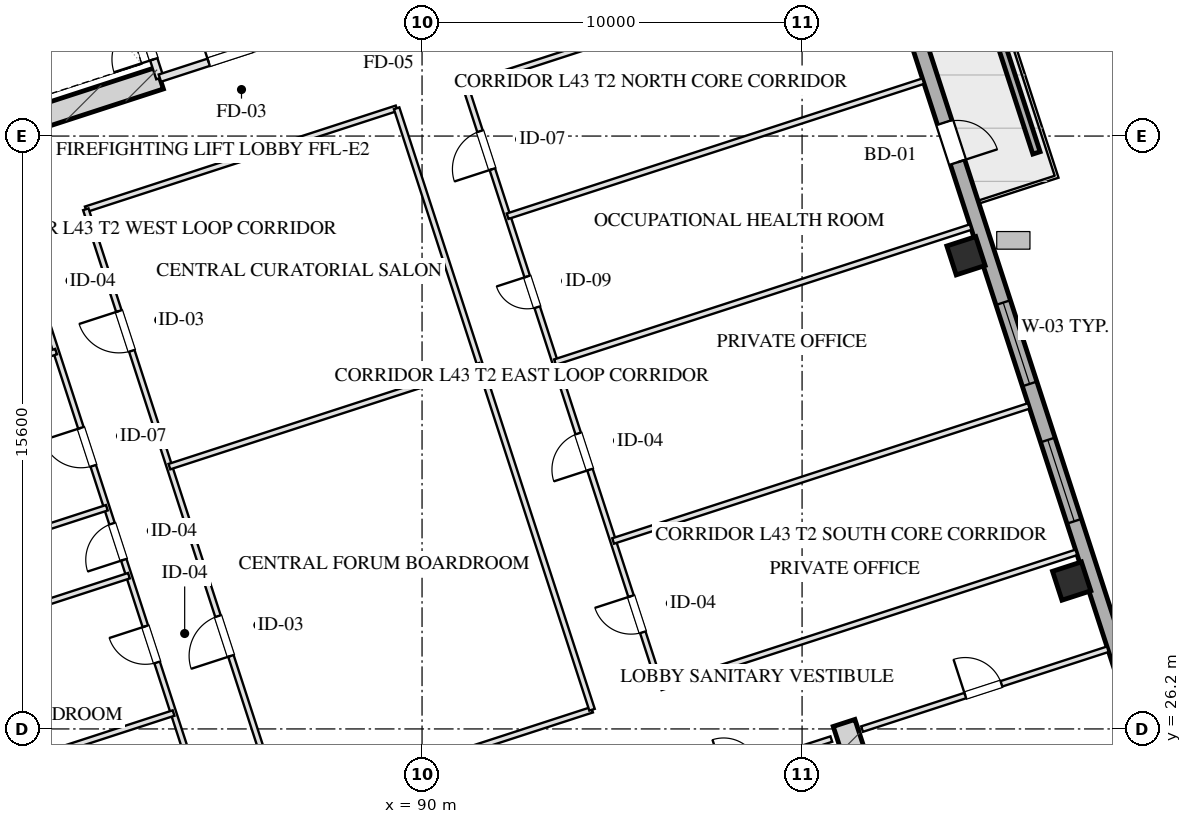
"""IFC4 building model, lengths in metres.
Left out: names, types, materials, properties, quantities, classifications, styles, units other than length and angle.
Written with IfcOpenShell. Run it as: python <this file> out.ifc"""

import sys

from ifc_helpers import new_model, si_unit, direction, frame, frame_2d, origin, origin_2d, place, context, subcontext, project, spatial, rectangle, hollow_rectangle, extrude, element, fill, save


model = new_model("IFC4")
c1 = context("Model", 3, precision=1e-05, world=origin(), true_north=direction((0.0, 1.0)))
c2 = subcontext(c1, "Body", "Model", "MODEL_VIEW")
j1 = project(units=[si_unit("LENGTHUNIT", "METRE"), si_unit("PLANEANGLEUNIT", "RADIAN")], contexts=[c1])
p1 = place(None, origin())
s1 = spatial("IfcSite", under=j1, at=p1, CompositionType="ELEMENT")
p2 = place(p1, origin())
s2 = spatial("IfcBuilding", under=s1, at=p2, CompositionType="ELEMENT")
p3 = place(p2, frame((0.0, 0.0, 163.3)))
s3 = spatial("IfcBuildingStorey", under=s2, at=p3, CompositionType="ELEMENT", Elevation=163.3)
p4 = place(p3, frame((101.105, 26.358, 0.0), z_axis=(0.0, 0.0, 1.0), x_axis=(0.309010370028, -0.95105866865, 0.0)))
e1 = element("IfcWall", 1, at=p4, inside=s3, PredefinedType="SHEAR", context=c2, shape_type="SweptSolid", body=[
    extrude(rectangle(XDim=9.48, YDim=0.6, at=frame_2d((4.74, 0.0))), origin(), (0.0, 0.0, 1.0), 3.45),
])
p5 = place(p3, frame((79.087, 42.021, 0.0), z_axis=(0.0, 0.0, 1.0), x_axis=(0.951062550203, 0.3089984233, 0.0)))
e2 = element("IfcWall", 2, at=p5, inside=s3, PredefinedType="SHEAR", context=c2, shape_type="SweptSolid", body=[
    extrude(rectangle(XDim=4.22, YDim=0.6, at=frame_2d((2.11, 0.0))), origin(), (0.0, 0.0, 1.0), 3.45),
])
for number, where, z_axis, x_axis in (
    (3, (107.094, 30.091, 0.0), (0.0, 0.0, 1.0), (0.951, 0.309, 0.0)),
    (4, (104.313, 38.651, 0.0), (0.0, 0.0, 1.0), (0.951, 0.309, 0.0)),
):
    element("IfcColumn", number, at=place(p3, frame(where, z_axis=z_axis, x_axis=x_axis)), inside=s3, PredefinedType="COLUMN", context=c2, shape_type="SweptSolid", body=[
        extrude(hollow_rectangle(XDim=0.8, YDim=0.8, WallThickness=0.028, at=origin_2d()), origin(), (0.0, 0.0, 1.0), 3.451),
    ])
p6 = place(p3, frame((81.776, 8.827, 0.0), z_axis=(0.0, 0.0, 1.0), x_axis=(-0.309014228706, 0.951057414911, 0.0)))
e5 = element("IfcWall", 5, at=p6, inside=s3, PredefinedType="SOLIDWALL", context=c2, shape_type="SweptSolid", body=[
    extrude(rectangle(XDim=42.8, YDim=0.4, at=frame_2d((21.4, 0.0))), origin(), (0.0, 0.0, 1.0), 2.61),
])
p7 = place(p6, frame((23.45, 0.0, 0.0)))
e6 = element("IfcOpeningElement", 6, at=p7, cuts=e5, PredefinedType="OPENING", context=c2, shape_type="SweptSolid", body=[
    extrude(rectangle(XDim=1.1, YDim=2.15, at=frame_2d((0.55, 1.075))), frame((0.0, 0.21, 0.0), z_axis=(0.0, -1.0, 0.0), x_axis=(1.0, 0.0, 0.0)), (0.0, 0.0, 1.0), 0.42),
])
p8 = place(p3, frame((98.224, 59.173, 0.0), z_axis=(0.0, 0.0, 1.0), x_axis=(0.309014228706, -0.951057414911, 0.0)))
e7 = element("IfcWall", 7, at=p8, inside=s3, PredefinedType="SOLIDWALL", context=c2, shape_type="SweptSolid", body=[
    extrude(rectangle(XDim=42.8, YDim=0.4, at=frame_2d((21.4, 0.0))), origin(), (0.0, 0.0, 1.0), 2.61),
])
p9 = place(p8, frame((26.675, 0.0, 0.75)))
e8 = element("IfcOpeningElement", 8, at=p9, cuts=e7, PredefinedType="OPENING", context=c2, shape_type="SweptSolid", body=[
    extrude(rectangle(XDim=2.25, YDim=1.46, at=frame_2d((1.125, 0.73))), frame((0.0, 0.21, 0.0), z_axis=(0.0, -1.0, 0.0), x_axis=(1.0, 0.0, 0.0)), (0.0, 0.0, 1.0), 0.42),
])
p10 = place(p8, frame((22.875, 0.0, 0.75)))
e9 = element("IfcOpeningElement", 9, at=p10, cuts=e7, PredefinedType="OPENING", context=c2, shape_type="SweptSolid", body=[
    extrude(rectangle(XDim=2.25, YDim=1.46, at=frame_2d((1.125, 0.73))), frame((0.0, 0.21, 0.0), z_axis=(0.0, -1.0, 0.0), x_axis=(1.0, 0.0, 0.0)), (0.0, 0.0, 1.0), 0.42),
])
p11 = place(p8, frame((17.892, 0.0, 0.0)))
e10 = element("IfcOpeningElement", 10, at=p11, cuts=e7, PredefinedType="OPENING", context=c2, shape_type="SweptSolid", body=[
    extrude(rectangle(XDim=1.1, YDim=2.15, at=frame_2d((0.55, 1.075))), frame((0.0, 0.21, 0.0), z_axis=(0.0, -1.0, 0.0), x_axis=(1.0, 0.0, 0.0)), (0.0, 0.0, 1.0), 0.42),
])
p12 = place(p3, frame((106.168, 41.356, 0.0), z_axis=(0.0, 0.0, 1.0), x_axis=(-0.309032019345, 0.951051634255, 0.0)))
e11 = element("IfcWall", 11, at=p12, inside=s3, PredefinedType="PARAPET", context=c2, shape_type="SweptSolid", body=[
    extrude(rectangle(XDim=4.8, YDim=0.2, at=frame_2d((2.4, 0.0))), origin(), (0.0, 0.0, 1.0), 0.75),
])
p13 = place(p3, frame((97.727, 24.944, 0.0), z_axis=(0.0, 0.0, 1.0), x_axis=(0.951036872128, 0.309077446369, 0.0)))
e12 = element("IfcWall", 12, at=p13, inside=s3, PredefinedType="PARTITIONING", context=c2, shape_type="SweptSolid", body=[
    extrude(rectangle(XDim=3.2, YDim=0.15, at=frame_2d((1.6, 0.0))), origin(), (0.0, 0.0, 1.0), 3.175),
])
p14 = place(p13, frame((0.22, 0.0, 0.0)))
e13 = element("IfcOpeningElement", 13, at=p14, cuts=e12, PredefinedType="OPENING", context=c2, shape_type="SweptSolid", body=[
    extrude(rectangle(XDim=0.95, YDim=2.05, at=frame_2d((0.475, 1.025))), frame((0.0, 0.085, 0.0), z_axis=(0.0, -1.0, 0.0), x_axis=(1.0, 0.0, 0.0)), (0.0, 0.0, 1.0), 0.17),
])
p15 = place(p3, frame((83.101, 43.324, 0.0), z_axis=(0.0, 0.0, 1.0), x_axis=(-0.309048298632, 0.951046344356, 0.0)))
e14 = element("IfcWall", 14, at=p15, inside=s3, PredefinedType="PARTITIONING", context=c2, shape_type="SweptSolid", body=[
    extrude(rectangle(XDim=1.9, YDim=0.2, at=frame_2d((0.95, 0.0))), origin(), (0.0, 0.0, 1.0), 3.175),
])
p16 = place(p15, frame((0.52, 0.0, 0.0)))
e15 = element("IfcOpeningElement", 15, at=p16, cuts=e14, PredefinedType="OPENING", context=c2, shape_type="SweptSolid", body=[
    extrude(rectangle(XDim=1.1, YDim=2.05, at=frame_2d((0.55, 1.025))), frame((0.0, 0.11, 0.0), z_axis=(0.0, -1.0, 0.0), x_axis=(1.0, 0.0, 0.0)), (0.0, 0.0, 1.0), 0.22),
])
p17 = place(p3, frame((83.101, 43.324, 0.0), z_axis=(0.0, 0.0, 1.0), x_axis=(0.951052804469, 0.309028417967, 0.0)))
e16 = element("IfcWall", 16, at=p17, inside=s3, PredefinedType="PARTITIONING", context=c2, shape_type="SweptSolid", body=[
    extrude(rectangle(XDim=3.83, YDim=0.2, at=frame_2d((1.915, 0.0))), origin(), (0.0, 0.0, 1.0), 3.175),
])
p18 = place(p17, frame((1.35, 0.0, 0.0)))
e17 = element("IfcOpeningElement", 17, at=p18, cuts=e16, PredefinedType="OPENING", context=c2, shape_type="SweptSolid", body=[
    extrude(rectangle(XDim=1.2, YDim=2.05, at=frame_2d((0.6, 1.025))), frame((0.0, 0.11, 0.0), z_axis=(0.0, -1.0, 0.0), x_axis=(1.0, 0.0, 0.0)), (0.0, 0.0, 1.0), 0.22),
])
p19 = place(p3, frame((101.578, 26.196, 0.0), z_axis=(0.0, 0.0, 1.0), x_axis=(0.951064934653, 0.308991084134, 0.0)))
e18 = element("IfcWall", 18, at=p19, inside=s3, PredefinedType="PARTITIONING", context=c2, shape_type="SweptSolid", body=[
    extrude(rectangle(XDim=6.8, YDim=0.15, at=frame_2d((3.4, 0.0))), origin(), (0.0, 0.0, 1.0), 3.175),
])
p20 = place(p19, frame((2.856, 0.0, 0.0)))
e19 = element("IfcOpeningElement", 19, at=p20, cuts=e18, PredefinedType="OPENING", context=c2, shape_type="SweptSolid", body=[
    extrude(rectangle(XDim=1.0, YDim=2.05, at=frame_2d((0.5, 1.025))), frame((0.0, 0.085, 0.0), z_axis=(0.0, -1.0, 0.0), x_axis=(1.0, 0.0, 0.0)), (0.0, 0.0, 1.0), 0.17),
])
p21 = place(p3, frame((86.294, 24.048, 0.0), z_axis=(0.0, 0.0, 1.0), x_axis=(0.951052008164, 0.309030868631, 0.0)))
e20 = element("IfcWall", 20, at=p21, inside=s3, PredefinedType="PARTITIONING", context=c2, shape_type="SweptSolid", body=[
    extrude(rectangle(XDim=8.6, YDim=0.15, at=frame_2d((4.3, 0.0))), origin(), (0.0, 0.0, 1.0), 3.175),
])
p22 = place(p3, frame((96.28, 27.292, 0.0), z_axis=(0.0, 0.0, 1.0), x_axis=(0.951056999652, 0.309015506751, 0.0)))
e21 = element("IfcWall", 21, at=p22, inside=s3, PredefinedType="PARTITIONING", context=c2, shape_type="SweptSolid", body=[
    extrude(rectangle(XDim=11.5, YDim=0.15, at=frame_2d((5.75, 0.0))), origin(), (0.0, 0.0, 1.0), 3.175),
])
p23 = place(p3, frame((81.152, 39.873, 0.0), z_axis=(0.0, 0.0, 1.0), x_axis=(0.951057640494, 0.309013534425, 0.0)))
e22 = element("IfcWall", 22, at=p23, inside=s3, PredefinedType="PARTITIONING", context=c2, shape_type="SweptSolid", body=[
    extrude(rectangle(XDim=8.6, YDim=0.15, at=frame_2d((4.3, 0.0))), origin(), (0.0, 0.0, 1.0), 3.175),
])
p24 = place(p3, frame((91.138, 43.118, 0.0), z_axis=(0.0, 0.0, 1.0), x_axis=(0.951054972381, 0.309021746015, 0.0)))
e23 = element("IfcWall", 23, at=p24, inside=s3, PredefinedType="PARTITIONING", context=c2, shape_type="SweptSolid", body=[
    extrude(rectangle(XDim=11.5, YDim=0.15, at=frame_2d((5.75, 0.0))), origin(), (0.0, 0.0, 1.0), 3.175),
])
p25 = place(p3, frame((84.487, 23.46, 0.0), z_axis=(0.0, 0.0, 1.0), x_axis=(-0.30901773025, 0.951056277195, 0.0)))
e24 = element("IfcWall", 24, at=p25, inside=s3, PredefinedType="PARTITIONING", context=c2, shape_type="SweptSolid", body=[
    extrude(rectangle(XDim=16.64, YDim=0.15, at=frame_2d((8.32, 0.0))), origin(), (0.0, 0.0, 1.0), 3.175),
])
p26 = place(p25, frame((1.16, 0.0, 0.0)))
e25 = element("IfcOpeningElement", 25, at=p26, cuts=e24, PredefinedType="OPENING", context=c2, shape_type="SweptSolid", body=[
    extrude(rectangle(XDim=1.0, YDim=2.05, at=frame_2d((0.5, 1.025))), frame((0.0, 0.085, 0.0), z_axis=(0.0, -1.0, 0.0), x_axis=(1.0, 0.0, 0.0)), (0.0, 0.0, 1.0), 0.17),
])
p27 = place(p25, frame((4.72, 0.0, 0.0)))
e26 = element("IfcOpeningElement", 26, at=p27, cuts=e24, PredefinedType="OPENING", context=c2, shape_type="SweptSolid", body=[
    extrude(rectangle(XDim=1.0, YDim=2.05, at=frame_2d((0.5, 1.025))), frame((0.0, 0.085, 0.0), z_axis=(0.0, -1.0, 0.0), x_axis=(1.0, 0.0, 0.0)), (0.0, 0.0, 1.0), 0.17),
])
p28 = place(p25, frame((7.56, 0.0, 0.0)))
e27 = element("IfcOpeningElement", 27, at=p28, cuts=e24, PredefinedType="OPENING", context=c2, shape_type="SweptSolid", body=[
    extrude(rectangle(XDim=1.0, YDim=2.05, at=frame_2d((0.5, 1.025))), frame((0.0, 0.085, 0.0), z_axis=(0.0, -1.0, 0.0), x_axis=(1.0, 0.0, 0.0)), (0.0, 0.0, 1.0), 0.17),
])
p29 = place(p25, frame((10.16, 0.0, 0.0)))
e28 = element("IfcOpeningElement", 28, at=p29, cuts=e24, PredefinedType="OPENING", context=c2, shape_type="SweptSolid", body=[
    extrude(rectangle(XDim=1.05, YDim=2.05, at=frame_2d((0.525, 1.025))), frame((0.0, 0.085, 0.0), z_axis=(0.0, -1.0, 0.0), x_axis=(1.0, 0.0, 0.0)), (0.0, 0.0, 1.0), 0.17),
])
p30 = place(p25, frame((14.48, 0.0, 0.0)))
e29 = element("IfcOpeningElement", 29, at=p30, cuts=e24, PredefinedType="OPENING", context=c2, shape_type="SweptSolid", body=[
    extrude(rectangle(XDim=1.0, YDim=2.05, at=frame_2d((0.5, 1.025))), frame((0.0, 0.085, 0.0), z_axis=(0.0, -1.0, 0.0), x_axis=(1.0, 0.0, 0.0)), (0.0, 0.0, 1.0), 0.17),
])
p31 = place(p3, frame((86.294, 24.048, 0.0), z_axis=(0.0, 0.0, 1.0), x_axis=(-0.309004459387, 0.951060589068, 0.0)))
e30 = element("IfcWall", 30, at=p31, inside=s3, PredefinedType="PARTITIONING", context=c2, shape_type="SweptSolid", body=[
    extrude(rectangle(XDim=16.64, YDim=0.15, at=frame_2d((8.32, 0.0))), origin(), (0.0, 0.0, 1.0), 3.175),
])
p32 = place(p31, frame((4.284, 0.0, 0.0)))
e31 = element("IfcOpeningElement", 31, at=p32, cuts=e30, PredefinedType="OPENING", context=c2, shape_type="SweptSolid", body=[
    extrude(rectangle(XDim=1.1, YDim=2.05, at=frame_2d((0.55, 1.025))), frame((0.0, 0.085, 0.0), z_axis=(0.0, -1.0, 0.0), x_axis=(1.0, 0.0, 0.0)), (0.0, 0.0, 1.0), 0.17),
])
p33 = place(p31, frame((12.724, 0.0, 0.0)))
e32 = element("IfcOpeningElement", 32, at=p33, cuts=e30, PredefinedType="OPENING", context=c2, shape_type="SweptSolid", body=[
    extrude(rectangle(XDim=1.1, YDim=2.05, at=frame_2d((0.55, 1.025))), frame((0.0, 0.085, 0.0), z_axis=(0.0, -1.0, 0.0), x_axis=(1.0, 0.0, 0.0)), (0.0, 0.0, 1.0), 0.17),
])
p34 = place(p3, frame((94.473, 26.705, 0.0), z_axis=(0.0, 0.0, 1.0), x_axis=(-0.309022042254, 0.951054876125, 0.0)))
e33 = element("IfcWall", 33, at=p34, inside=s3, PredefinedType="PARTITIONING", context=c2, shape_type="SweptSolid", body=[
    extrude(rectangle(XDim=16.64, YDim=0.15, at=frame_2d((8.32, 0.0))), origin(), (0.0, 0.0, 1.0), 3.175),
])
p35 = place(p3, frame((96.28, 27.292, 0.0), z_axis=(0.0, 0.0, 1.0), x_axis=(-0.309008771245, 0.951059188113, 0.0)))
e34 = element("IfcWall", 34, at=p35, inside=s3, PredefinedType="PARTITIONING", context=c2, shape_type="SweptSolid", body=[
    extrude(rectangle(XDim=16.64, YDim=0.15, at=frame_2d((8.32, 0.0))), origin(), (0.0, 0.0, 1.0), 3.175),
])
p36 = place(p35, frame((1.526, 0.0, 0.0)))
e35 = element("IfcOpeningElement", 35, at=p36, cuts=e34, PredefinedType="OPENING", context=c2, shape_type="SweptSolid", body=[
    extrude(rectangle(XDim=1.0, YDim=2.05, at=frame_2d((0.5, 1.025))), frame((0.0, 0.085, 0.0), z_axis=(0.0, -1.0, 0.0), x_axis=(1.0, 0.0, 0.0)), (0.0, 0.0, 1.0), 0.17),
])
p37 = place(p35, frame((6.026, 0.0, 0.0)))
e36 = element("IfcOpeningElement", 36, at=p37, cuts=e34, PredefinedType="OPENING", context=c2, shape_type="SweptSolid", body=[
    extrude(rectangle(XDim=1.0, YDim=2.05, at=frame_2d((0.5, 1.025))), frame((0.0, 0.085, 0.0), z_axis=(0.0, -1.0, 0.0), x_axis=(1.0, 0.0, 0.0)), (0.0, 0.0, 1.0), 0.17),
])
p38 = place(p35, frame((10.519, 0.0, 0.0)))
e37 = element("IfcOpeningElement", 37, at=p38, cuts=e34, PredefinedType="OPENING", context=c2, shape_type="SweptSolid", body=[
    extrude(rectangle(XDim=0.85, YDim=2.05, at=frame_2d((0.425, 1.025))), frame((0.0, 0.085, 0.0), z_axis=(0.0, -1.0, 0.0), x_axis=(1.0, 0.0, 0.0)), (0.0, 0.0, 1.0), 0.17),
])
p39 = place(p35, frame((14.338, 0.0, 0.0)))
e38 = element("IfcOpeningElement", 38, at=p39, cuts=e34, PredefinedType="OPENING", context=c2, shape_type="SweptSolid", body=[
    extrude(rectangle(XDim=1.05, YDim=2.05, at=frame_2d((0.525, 1.025))), frame((0.0, 0.085, 0.0), z_axis=(0.0, -1.0, 0.0), x_axis=(1.0, 0.0, 0.0)), (0.0, 0.0, 1.0), 0.17),
])
p40 = place(p3, frame((83.352, 33.102, 0.0), z_axis=(0.0, 0.0, 1.0), x_axis=(0.951057640494, 0.309013534425, 0.0)))
e39 = element("IfcWall", 39, at=p40, inside=s3, PredefinedType="PARTITIONING", context=c2, shape_type="SweptSolid", body=[
    extrude(rectangle(XDim=8.6, YDim=0.15, at=frame_2d((4.3, 0.0))), origin(), (0.0, 0.0, 1.0), 3.175),
])
for number, where, z_axis, x_axis in (
    (40, (76.899, 24.486, 0.0), (0.0, 0.0, 1.0), (0.951, 0.309, 0.0)),
    (41, (75.725, 28.1, 0.0), (0.0, 0.0, 1.0), (0.951, 0.309, 0.0)),
    (42, (75.144, 29.888, 0.0), (0.0, 0.0, 1.0), (0.951, 0.309, 0.0)),
    (43, (73.809, 33.996, 0.0), (0.0, 0.0, 1.0), (0.951, 0.309, 0.0)),
):
    element("IfcWall", number, at=place(p3, frame(where, z_axis=z_axis, x_axis=x_axis)), inside=s3, PredefinedType="PARTITIONING", context=c2, shape_type="SweptSolid", body=[
        extrude(rectangle(XDim=6.9, YDim=0.15, at=frame_2d((3.45, 0.0))), origin(), (0.0, 0.0, 1.0), 3.175),
    ])
p41 = place(p3, frame((95.028, 31.146, 0.0), z_axis=(0.0, 0.0, 1.0), x_axis=(0.951056999652, 0.309015506751, 0.0)))
e44 = element("IfcWall", 44, at=p41, inside=s3, PredefinedType="PARTITIONING", context=c2, shape_type="SweptSolid", body=[
    extrude(rectangle(XDim=11.5, YDim=0.15, at=frame_2d((5.75, 0.0))), origin(), (0.0, 0.0, 1.0), 3.175),
])
p42 = place(p3, frame((93.499, 35.852, 0.0), z_axis=(0.0, 0.0, 1.0), x_axis=(0.951054972381, 0.309021746015, 0.0)))
e45 = element("IfcWall", 45, at=p42, inside=s3, PredefinedType="PARTITIONING", context=c2, shape_type="SweptSolid", body=[
    extrude(rectangle(XDim=11.5, YDim=0.15, at=frame_2d((5.75, 0.0))), origin(), (0.0, 0.0, 1.0), 3.175),
])
p43 = place(p3, frame((92.251, 39.691, 0.0), z_axis=(0.0, 0.0, 1.0), x_axis=(0.951063238644, 0.308996304347, 0.0)))
e46 = element("IfcWall", 46, at=p43, inside=s3, PredefinedType="PARTITIONING", context=c2, shape_type="SweptSolid", body=[
    extrude(rectangle(XDim=11.5, YDim=0.15, at=frame_2d((5.75, 0.0))), origin(), (0.0, 0.0, 1.0), 3.175),
])
p44 = place(p9, origin())
e47 = element("IfcWindow", 47, at=p44, inside=s3, PartitioningType="TRIPLE_PANEL_VERTICAL", PredefinedType="WINDOW", context=c2, shape_type="SweptSolid", body=[
    extrude(rectangle(XDim=2.25, YDim=1.46, at=frame_2d((1.125, 0.73))), frame((0.0, 0.03, 0.0), z_axis=(0.0, -1.0, 0.0), x_axis=(1.0, 0.0, 0.0)), (0.0, 0.0, 1.0), 0.06),
])
fill(e8, e47)
p45 = place(p10, origin())
e48 = element("IfcWindow", 48, at=p45, inside=s3, PartitioningType="TRIPLE_PANEL_VERTICAL", PredefinedType="WINDOW", context=c2, shape_type="SweptSolid", body=[
    extrude(rectangle(XDim=2.25, YDim=1.46, at=frame_2d((1.125, 0.73))), frame((0.0, 0.03, 0.0), z_axis=(0.0, -1.0, 0.0), x_axis=(1.0, 0.0, 0.0)), (0.0, 0.0, 1.0), 0.06),
])
fill(e9, e48)
p46 = place(p11, origin())
e49 = element("IfcDoor", 49, at=p46, inside=s3, OperationType="SINGLE_SWING_RIGHT", PredefinedType="DOOR", context=c2, shape_type="SweptSolid", body=[
    extrude(rectangle(XDim=1.1, YDim=2.15, at=frame_2d((0.55, 1.075))), frame((0.0, 0.025, 0.0), z_axis=(0.0, -1.0, 0.0), x_axis=(1.0, 0.0, 0.0)), (0.0, 0.0, 1.0), 0.05),
])
fill(e10, e49)
p47 = place(p16, origin())
e50 = element("IfcDoor", 50, at=p47, inside=s3, OperationType="SINGLE_SWING_LEFT", PredefinedType="DOOR", context=c2, shape_type="SweptSolid", body=[
    extrude(rectangle(XDim=1.1, YDim=2.05, at=frame_2d((0.55, 1.025))), frame((0.0, 0.025, 0.0), z_axis=(0.0, -1.0, 0.0), x_axis=(1.0, 0.0, 0.0)), (0.0, 0.0, 1.0), 0.05),
])
fill(e15, e50)
p48 = place(p18, origin())
e51 = element("IfcDoor", 51, at=p48, inside=s3, OperationType="SINGLE_SWING_LEFT", PredefinedType="DOOR", context=c2, shape_type="SweptSolid", body=[
    extrude(rectangle(XDim=1.2, YDim=2.05, at=frame_2d((0.6, 1.025))), frame((0.0, 0.025, 0.0), z_axis=(0.0, -1.0, 0.0), x_axis=(1.0, 0.0, 0.0)), (0.0, 0.0, 1.0), 0.05),
])
fill(e17, e51)
p49 = place(p20, origin())
e52 = element("IfcDoor", 52, at=p49, inside=s3, OperationType="SINGLE_SWING_LEFT", PredefinedType="DOOR", context=c2, shape_type="SweptSolid", body=[
    extrude(rectangle(XDim=1.0, YDim=2.05, at=frame_2d((0.5, 1.025))), frame((0.0, 0.025, 0.0), z_axis=(0.0, -1.0, 0.0), x_axis=(1.0, 0.0, 0.0)), (0.0, 0.0, 1.0), 0.05),
])
fill(e19, e52)
p50 = place(p27, origin())
e53 = element("IfcDoor", 53, at=p50, inside=s3, OperationType="SINGLE_SWING_RIGHT", PredefinedType="DOOR", context=c2, shape_type="SweptSolid", body=[
    extrude(rectangle(XDim=1.0, YDim=2.05, at=frame_2d((0.5, 1.025))), frame((0.0, 0.025, 0.0), z_axis=(0.0, -1.0, 0.0), x_axis=(1.0, 0.0, 0.0)), (0.0, 0.0, 1.0), 0.05),
])
fill(e26, e53)
p51 = place(p28, origin())
e54 = element("IfcDoor", 54, at=p51, inside=s3, OperationType="SINGLE_SWING_LEFT", PredefinedType="DOOR", context=c2, shape_type="SweptSolid", body=[
    extrude(rectangle(XDim=1.0, YDim=2.05, at=frame_2d((0.5, 1.025))), frame((0.0, 0.025, 0.0), z_axis=(0.0, -1.0, 0.0), x_axis=(1.0, 0.0, 0.0)), (0.0, 0.0, 1.0), 0.05),
])
fill(e27, e54)
p52 = place(p29, origin())
e55 = element("IfcDoor", 55, at=p52, inside=s3, OperationType="SINGLE_SWING_RIGHT", PredefinedType="DOOR", context=c2, shape_type="SweptSolid", body=[
    extrude(rectangle(XDim=1.05, YDim=2.05, at=frame_2d((0.525, 1.025))), frame((0.0, 0.025, 0.0), z_axis=(0.0, -1.0, 0.0), x_axis=(1.0, 0.0, 0.0)), (0.0, 0.0, 1.0), 0.05),
])
fill(e28, e55)
p53 = place(p32, origin())
e56 = element("IfcDoor", 56, at=p53, inside=s3, OperationType="SINGLE_SWING_LEFT", PredefinedType="DOOR", context=c2, shape_type="SweptSolid", body=[
    extrude(rectangle(XDim=1.1, YDim=2.05, at=frame_2d((0.55, 1.025))), frame((0.0, 0.025, 0.0), z_axis=(0.0, -1.0, 0.0), x_axis=(1.0, 0.0, 0.0)), (0.0, 0.0, 1.0), 0.05),
])
fill(e31, e56)
p54 = place(p33, origin())
e57 = element("IfcDoor", 57, at=p54, inside=s3, OperationType="SINGLE_SWING_RIGHT", PredefinedType="DOOR", context=c2, shape_type="SweptSolid", body=[
    extrude(rectangle(XDim=1.1, YDim=2.05, at=frame_2d((0.55, 1.025))), frame((0.0, 0.025, 0.0), z_axis=(0.0, -1.0, 0.0), x_axis=(1.0, 0.0, 0.0)), (0.0, 0.0, 1.0), 0.05),
])
fill(e32, e57)
p55 = place(p36, origin())
e58 = element("IfcDoor", 58, at=p55, inside=s3, OperationType="SINGLE_SWING_RIGHT", PredefinedType="DOOR", context=c2, shape_type="SweptSolid", body=[
    extrude(rectangle(XDim=1.0, YDim=2.05, at=frame_2d((0.5, 1.025))), frame((0.0, 0.025, 0.0), z_axis=(0.0, -1.0, 0.0), x_axis=(1.0, 0.0, 0.0)), (0.0, 0.0, 1.0), 0.05),
])
fill(e35, e58)
p56 = place(p37, origin())
e59 = element("IfcDoor", 59, at=p56, inside=s3, OperationType="SINGLE_SWING_LEFT", PredefinedType="DOOR", context=c2, shape_type="SweptSolid", body=[
    extrude(rectangle(XDim=1.0, YDim=2.05, at=frame_2d((0.5, 1.025))), frame((0.0, 0.025, 0.0), z_axis=(0.0, -1.0, 0.0), x_axis=(1.0, 0.0, 0.0)), (0.0, 0.0, 1.0), 0.05),
])
fill(e36, e59)
p57 = place(p38, origin())
e60 = element("IfcDoor", 60, at=p57, inside=s3, OperationType="SINGLE_SWING_RIGHT", PredefinedType="DOOR", context=c2, shape_type="SweptSolid", body=[
    extrude(rectangle(XDim=0.85, YDim=2.05, at=frame_2d((0.425, 1.025))), frame((0.0, 0.025, 0.0), z_axis=(0.0, -1.0, 0.0), x_axis=(1.0, 0.0, 0.0)), (0.0, 0.0, 1.0), 0.05),
])
fill(e37, e60)
p58 = place(p39, origin())
e61 = element("IfcDoor", 61, at=p58, inside=s3, OperationType="SINGLE_SWING_LEFT", PredefinedType="DOOR", context=c2, shape_type="SweptSolid", body=[
    extrude(rectangle(XDim=1.05, YDim=2.05, at=frame_2d((0.525, 1.025))), frame((0.0, 0.025, 0.0), z_axis=(0.0, -1.0, 0.0), x_axis=(1.0, 0.0, 0.0)), (0.0, 0.0, 1.0), 0.05),
])
fill(e38, e61)
save(model, sys.argv[1])
